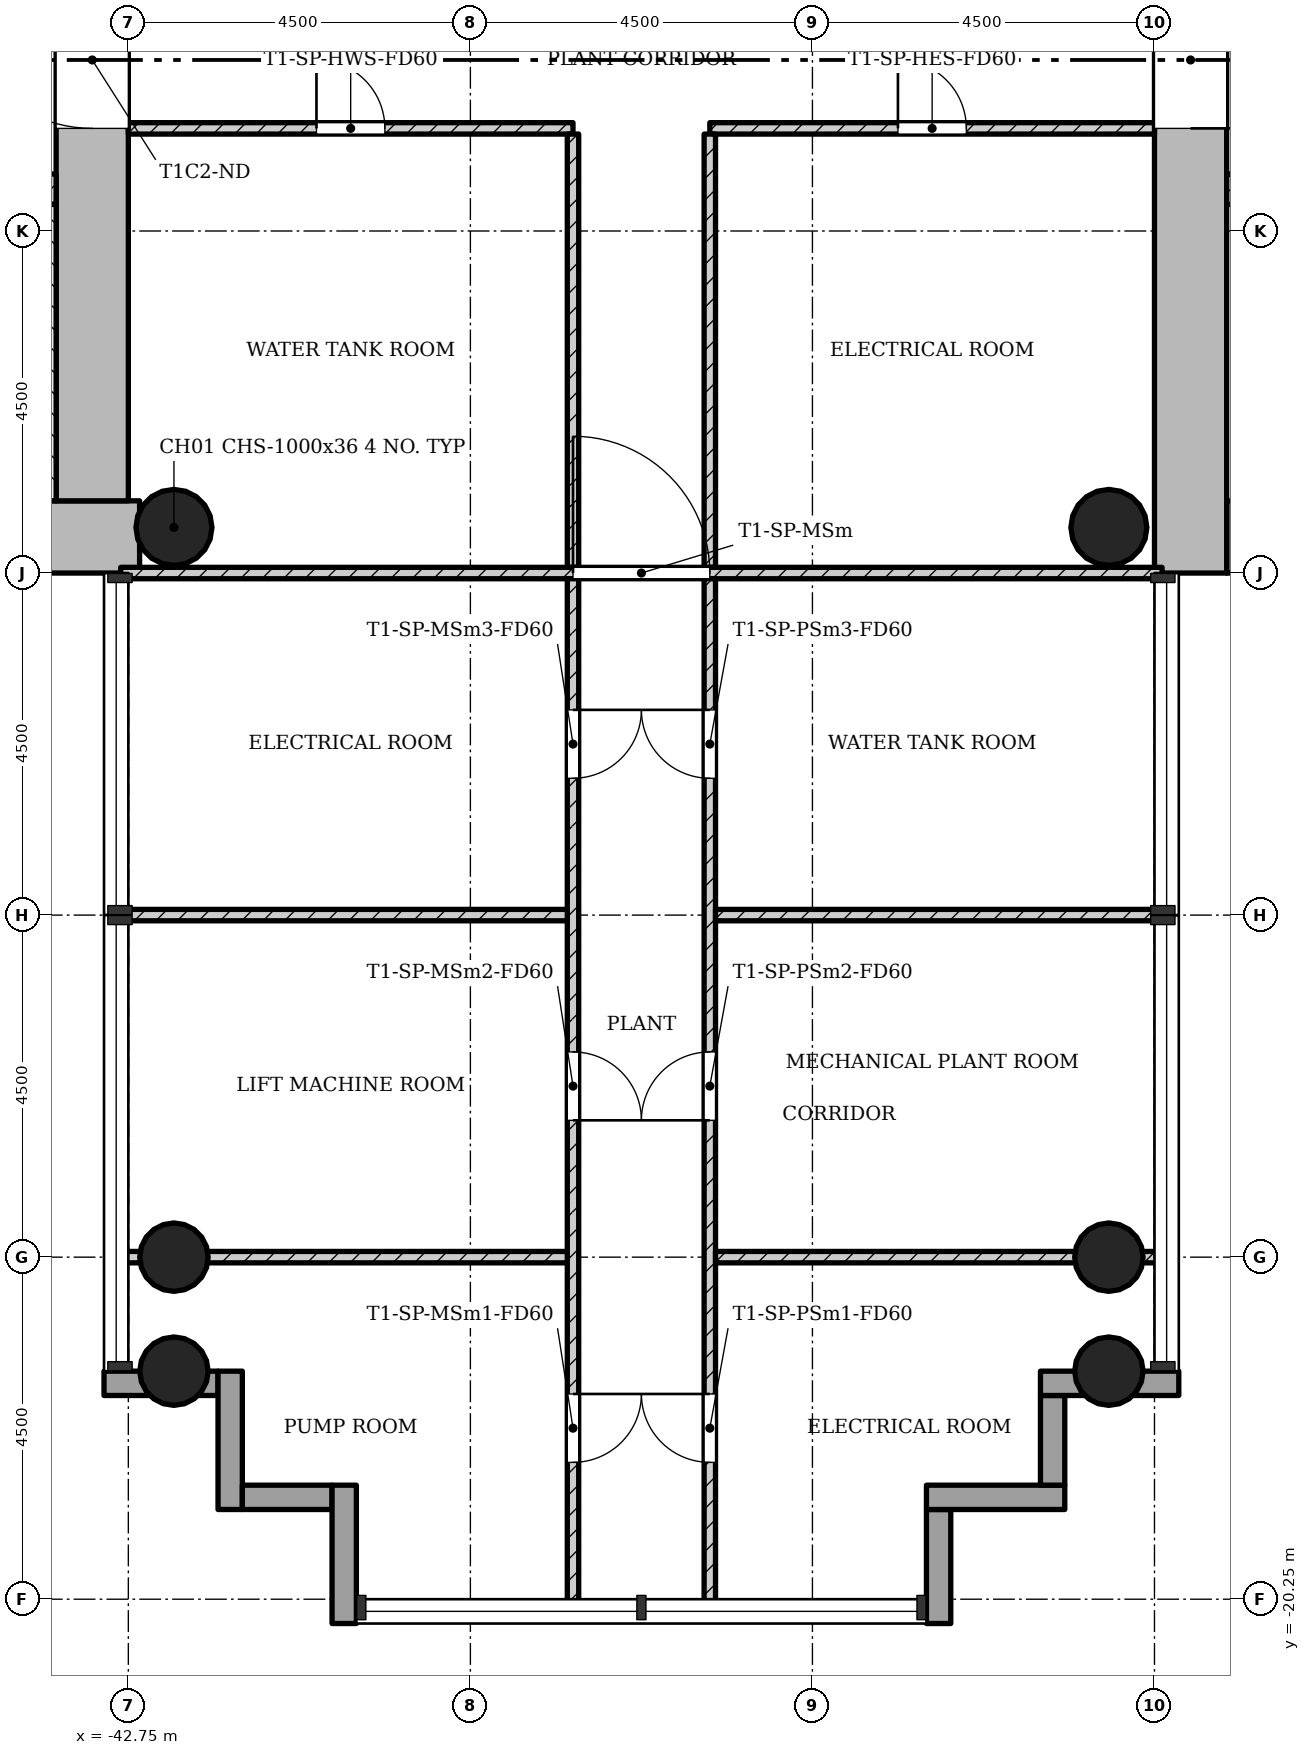
"""IFC4 building model, lengths in metres.
Left out: names, types, materials, properties, quantities, classifications, styles, units other than length and angle.
Written with IfcOpenShell. Run it as: python <this file> out.ifc"""

import sys

from ifc_helpers import new_model, si_unit, direction, frame, frame_2d, origin, origin_2d, place, context, subcontext, project, spatial, rectangle, hollow_circle, extrude, element, fill, save


model = new_model("IFC4")
c1 = context("Model", 3, precision=1e-05, world=origin(), true_north=direction((0.0, 1.0)))
c2 = subcontext(c1, "Body", "Model", "MODEL_VIEW")
j1 = project(units=[si_unit("LENGTHUNIT", "METRE"), si_unit("PLANEANGLEUNIT", "RADIAN")], contexts=[c1])
p1 = place(None, origin())
s1 = spatial("IfcSite", under=j1, at=p1, CompositionType="ELEMENT")
p2 = place(p1, origin())
s2 = spatial("IfcBuilding", under=s1, at=p2, CompositionType="ELEMENT")
p3 = place(p2, frame((0.0, 0.0, 124.2)))
s3 = spatial("IfcBuildingStorey", under=s2, at=p3, CompositionType="ELEMENT", Elevation=124.2)
p4 = place(p3, frame((-28.3, -6.275, 0.0), z_axis=(0.0, 0.0, 1.0), x_axis=(1.0, 0.0, 0.0)))
e1 = element("IfcWall", 1, at=p4, inside=s3, PredefinedType="SHEAR", context=c2, shape_type="SweptSolid", body=[
    extrude(rectangle(XDim=8.05, YDim=0.95, at=frame_2d((4.025, 0.0))), origin(), (0.0, 0.0, 1.0), 4.5),
])
p5 = place(p3, frame((-28.775, 5.8, 0.0), z_axis=(0.0, 0.0, 1.0), x_axis=(0.0, -1.0, 0.0)))
e2 = element("IfcWall", 2, at=p5, inside=s3, PredefinedType="SHEAR", context=c2, shape_type="SweptSolid", body=[
    extrude(rectangle(XDim=12.55, YDim=0.95, at=frame_2d((6.275, 0.0))), origin(), (0.0, 0.0, 1.0), 4.5),
])
p6 = place(p5, frame((4.9, 0.0, 0.0)))
e3 = element("IfcOpeningElement", 3, at=p6, cuts=e2, PredefinedType="OPENING", context=c2, shape_type="SweptSolid", body=[
    extrude(rectangle(XDim=1.8, YDim=2.1, at=frame_2d((0.9, 1.05))), frame((0.0, 0.485, 0.0), z_axis=(0.0, -1.0, 0.0), x_axis=(1.0, 0.0, 0.0)), (0.0, 0.0, 1.0), 0.97),
])
p7 = place(p3, frame((-28.3, -1.7, 0.0), z_axis=(0.0, 0.0, 1.0), x_axis=(1.0, 0.0, 0.0)))
e4 = element("IfcWall", 4, at=p7, inside=s3, PredefinedType="SHEAR", context=c2, shape_type="SweptSolid", body=[
    extrude(rectangle(XDim=7.1, YDim=0.4, at=frame_2d((3.55, 0.0))), origin(), (0.0, 0.0, 1.0), 4.5),
])
p8 = place(p3, frame((-51.298, -6.275, 0.0), z_axis=(0.0, 0.0, 1.0), x_axis=(1.0, 0.0, 0.0)))
e5 = element("IfcWall", 5, at=p8, inside=s3, PredefinedType="SHEAR", context=c2, shape_type="SweptSolid", body=[
    extrude(rectangle(XDim=8.696, YDim=0.95, at=frame_2d((4.348, 0.0))), origin(), (0.0, 0.0, 1.0), 4.5),
])
p9 = place(p3, frame((-43.225, -5.8, 0.0), z_axis=(0.0, 0.0, 1.0), x_axis=(0.0, 1.0, 0.0)))
e6 = element("IfcWall", 6, at=p9, inside=s3, PredefinedType="SHEAR", context=c2, shape_type="SweptSolid", body=[
    extrude(rectangle(XDim=12.55, YDim=0.95, at=frame_2d((6.275, 0.0))), origin(), (0.0, 0.0, 1.0), 4.5),
])
p10 = place(p9, frame((4.9, 0.0, 0.0)))
e7 = element("IfcOpeningElement", 7, at=p10, cuts=e6, PredefinedType="OPENING", context=c2, shape_type="SweptSolid", body=[
    extrude(rectangle(XDim=1.8, YDim=2.1, at=frame_2d((0.9, 1.05))), frame((0.0, 0.485, 0.0), z_axis=(0.0, -1.0, 0.0), x_axis=(1.0, 0.0, 0.0)), (0.0, 0.0, 1.0), 0.97),
])
p11 = place(p3, frame((-50.8, -1.7, 0.0), z_axis=(0.0, 0.0, 1.0), x_axis=(1.0, 0.0, 0.0)))
e8 = element("IfcWall", 8, at=p11, inside=s3, PredefinedType="SHEAR", context=c2, shape_type="SweptSolid", body=[
    extrude(rectangle(XDim=7.1, YDim=0.4, at=frame_2d((3.55, 0.0))), origin(), (0.0, 0.0, 1.0), 4.5),
])
p12 = place(p11, frame((5.5, 0.0, 0.0)))
e9 = element("IfcOpeningElement", 9, at=p12, cuts=e8, PredefinedType="OPENING", context=c2, shape_type="SweptSolid", body=[
    extrude(rectangle(XDim=0.9, YDim=2.1, at=frame_2d((0.45, 1.05))), frame((0.0, 0.21, 0.0), z_axis=(0.0, -1.0, 0.0), x_axis=(1.0, 0.0, 0.0)), (0.0, 0.0, 1.0), 0.42),
])
for number, where, z_axis, x_axis in (
    (10, (-42.15, -15.75, 0.0), (0.0, 0.0, 1.0), (1.0, 0.0, 0.0)),
    (11, (-29.85, -15.75, 0.0), (0.0, 0.0, 1.0), (1.0, 0.0, 0.0)),
    (12, (-42.15, -17.25, 0.0), (0.0, 0.0, 1.0), (1.0, 0.0, 0.0)),
    (13, (-29.85, -17.25, 0.0), (0.0, 0.0, 1.0), (1.0, 0.0, 0.0)),
):
    element("IfcColumn", number, at=place(p3, frame(where, z_axis=z_axis, x_axis=x_axis)), inside=s3, PredefinedType="COLUMN", context=c2, shape_type="SweptSolid", body=[
        extrude(hollow_circle(Radius=0.45, WallThickness=0.032, at=origin_2d()), origin(), (0.0, 0.0, 1.0), 4.5),
    ])
for number, where, z_axis, x_axis in (
    (14, (-42.15, -6.15, 0.0), (0.0, 0.0, 1.0), (1.0, 0.0, 0.0)),
    (15, (-29.85, -6.15, 0.0), (0.0, 0.0, 1.0), (1.0, 0.0, 0.0)),
):
    element("IfcColumn", number, at=place(p3, frame(where, z_axis=z_axis, x_axis=x_axis)), inside=s3, PredefinedType="COLUMN", context=c2, shape_type="SweptSolid", body=[
        extrude(hollow_circle(Radius=0.5, WallThickness=0.036, at=origin_2d()), origin(), (0.0, 0.0, 1.0), 4.5),
    ])
p13 = place(p3, frame((-43.07, -17.41, -0.3), z_axis=(0.0, 0.0, 1.0), x_axis=(1.0, 0.0, 0.0)))
e16 = element("IfcWall", 16, at=p13, inside=s3, PredefinedType="STANDARD", context=c2, shape_type="SweptSolid", body=[
    extrude(rectangle(XDim=1.5, YDim=0.32, at=frame_2d((0.75, 0.0))), origin(), (0.0, 0.0, 1.0), 4.5),
])
p14 = place(p3, frame((-41.41, -17.25, -0.3), z_axis=(0.0, 0.0, 1.0), x_axis=(0.0, -1.0, 0.0)))
e17 = element("IfcWall", 17, at=p14, inside=s3, PredefinedType="STANDARD", context=c2, shape_type="SweptSolid", body=[
    extrude(rectangle(XDim=1.82, YDim=0.32, at=frame_2d((0.91, 0.0))), origin(), (0.0, 0.0, 1.0), 4.5),
])
p15 = place(p3, frame((-41.25, -18.91, -0.3), z_axis=(0.0, 0.0, 1.0), x_axis=(1.0, 0.0, 0.0)))
e18 = element("IfcWall", 18, at=p15, inside=s3, PredefinedType="STANDARD", context=c2, shape_type="SweptSolid", body=[
    extrude(rectangle(XDim=1.18, YDim=0.32, at=frame_2d((0.59, 0.0))), origin(), (0.0, 0.0, 1.0), 4.5),
])
p16 = place(p3, frame((-39.91, -18.75, -0.3), z_axis=(0.0, 0.0, 1.0), x_axis=(0.0, -1.0, 0.0)))
e19 = element("IfcWall", 19, at=p16, inside=s3, PredefinedType="STANDARD", context=c2, shape_type="SweptSolid", body=[
    extrude(rectangle(XDim=1.82, YDim=0.32, at=frame_2d((0.91, 0.0))), origin(), (0.0, 0.0, 1.0), 4.5),
])
p17 = place(p3, frame((-32.09, -20.57, -0.3), z_axis=(0.0, 0.0, 1.0), x_axis=(0.0, 1.0, 0.0)))
e20 = element("IfcWall", 20, at=p17, inside=s3, PredefinedType="STANDARD", context=c2, shape_type="SweptSolid", body=[
    extrude(rectangle(XDim=1.5, YDim=0.32, at=frame_2d((0.75, 0.0))), origin(), (0.0, 0.0, 1.0), 4.5),
])
p18 = place(p3, frame((-32.25, -18.91, -0.3), z_axis=(0.0, 0.0, 1.0), x_axis=(1.0, 0.0, 0.0)))
e21 = element("IfcWall", 21, at=p18, inside=s3, PredefinedType="STANDARD", context=c2, shape_type="SweptSolid", body=[
    extrude(rectangle(XDim=1.82, YDim=0.32, at=frame_2d((0.91, 0.0))), origin(), (0.0, 0.0, 1.0), 4.5),
])
p19 = place(p3, frame((-30.59, -18.75, -0.3), z_axis=(0.0, 0.0, 1.0), x_axis=(0.0, 1.0, 0.0)))
e22 = element("IfcWall", 22, at=p19, inside=s3, PredefinedType="STANDARD", context=c2, shape_type="SweptSolid", body=[
    extrude(rectangle(XDim=1.18, YDim=0.32, at=frame_2d((0.59, 0.0))), origin(), (0.0, 0.0, 1.0), 4.5),
])
p20 = place(p3, frame((-30.75, -17.41, -0.3), z_axis=(0.0, 0.0, 1.0), x_axis=(1.0, 0.0, 0.0)))
e23 = element("IfcWall", 23, at=p20, inside=s3, PredefinedType="STANDARD", context=c2, shape_type="SweptSolid", body=[
    extrude(rectangle(XDim=1.82, YDim=0.32, at=frame_2d((0.91, 0.0))), origin(), (0.0, 0.0, 1.0), 4.5),
])
p21 = place(p3, frame((-35.1, -0.9, 0.0), z_axis=(0.0, 0.0, 1.0), x_axis=(1.0, 0.0, 0.0)))
e24 = element("IfcWall", 24, at=p21, inside=s3, PredefinedType="PARTITIONING", context=c2, shape_type="SweptSolid", body=[
    extrude(rectangle(XDim=5.85, YDim=0.15, at=frame_2d((2.925, 0.0))), origin(), (0.0, 0.0, 1.0), 4.1),
])
p22 = place(p21, frame((2.475, 0.0, 0.0)))
e25 = element("IfcOpeningElement", 25, at=p22, cuts=e24, PredefinedType="OPENING", context=c2, shape_type="SweptSolid", body=[
    extrude(rectangle(XDim=0.9, YDim=2.1, at=frame_2d((0.45, 1.05))), frame((0.0, 0.085, 0.0), z_axis=(0.0, -1.0, 0.0), x_axis=(1.0, 0.0, 0.0)), (0.0, 0.0, 1.0), 0.17),
])
p23 = place(p3, frame((-35.1, -6.675, 0.0), z_axis=(0.0, 0.0, 1.0), x_axis=(0.0, 1.0, 0.0)))
e26 = element("IfcWall", 26, at=p23, inside=s3, PredefinedType="PARTITIONING", context=c2, shape_type="SweptSolid", body=[
    extrude(rectangle(XDim=5.7, YDim=0.15, at=frame_2d((2.85, 0.0))), origin(), (0.0, 0.0, 1.0), 4.1),
])
p24 = place(p3, frame((-42.75, -0.9, 0.0), z_axis=(0.0, 0.0, 1.0), x_axis=(1.0, 0.0, 0.0)))
e27 = element("IfcWall", 27, at=p24, inside=s3, PredefinedType="PARTITIONING", context=c2, shape_type="SweptSolid", body=[
    extrude(rectangle(XDim=5.85, YDim=0.15, at=frame_2d((2.925, 0.0))), origin(), (0.0, 0.0, 1.0), 4.1),
])
p25 = place(p24, frame((2.475, 0.0, 0.0)))
e28 = element("IfcOpeningElement", 28, at=p25, cuts=e27, PredefinedType="OPENING", context=c2, shape_type="SweptSolid", body=[
    extrude(rectangle(XDim=0.9, YDim=2.1, at=frame_2d((0.45, 1.05))), frame((0.0, 0.085, 0.0), z_axis=(0.0, -1.0, 0.0), x_axis=(1.0, 0.0, 0.0)), (0.0, 0.0, 1.0), 0.17),
])
p26 = place(p3, frame((-36.9, -6.675, 0.0), z_axis=(0.0, 0.0, 1.0), x_axis=(0.0, 1.0, 0.0)))
e29 = element("IfcWall", 29, at=p26, inside=s3, PredefinedType="PARTITIONING", context=c2, shape_type="SweptSolid", body=[
    extrude(rectangle(XDim=5.7, YDim=0.15, at=frame_2d((2.85, 0.0))), origin(), (0.0, 0.0, 1.0), 4.1),
])
p27 = place(p3, frame((-42.85, -6.75, 0.0), z_axis=(0.0, 0.0, 1.0), x_axis=(1.0, 0.0, 0.0)))
e30 = element("IfcWall", 30, at=p27, inside=s3, PredefinedType="PARTITIONING", context=c2, shape_type="SweptSolid", body=[
    extrude(rectangle(XDim=13.7, YDim=0.15, at=frame_2d((6.85, 0.0))), origin(), (0.0, 0.0, 1.0), 4.1),
])
p28 = place(p27, frame((5.95, 0.0, 0.0)))
e31 = element("IfcOpeningElement", 31, at=p28, cuts=e30, PredefinedType="OPENING", context=c2, shape_type="SweptSolid", body=[
    extrude(rectangle(XDim=1.8, YDim=2.1, at=frame_2d((0.9, 1.05))), frame((0.0, 0.085, 0.0), z_axis=(0.0, -1.0, 0.0), x_axis=(1.0, 0.0, 0.0)), (0.0, 0.0, 1.0), 0.17),
])
p29 = place(p3, frame((-35.1, -20.35, 0.0), z_axis=(0.0, 0.0, 1.0), x_axis=(0.0, 1.0, 0.0)))
e32 = element("IfcWall", 32, at=p29, inside=s3, PredefinedType="PARTITIONING", context=c2, shape_type="SweptSolid", body=[
    extrude(rectangle(XDim=13.525, YDim=0.15, at=frame_2d((6.763, 0.0))), origin(), (0.0, 0.0, 1.0), 4.1),
])
p30 = place(p29, frame((1.9, 0.0, 0.0)))
e33 = element("IfcOpeningElement", 33, at=p30, cuts=e32, PredefinedType="OPENING", context=c2, shape_type="SweptSolid", body=[
    extrude(rectangle(XDim=0.9, YDim=2.1, at=frame_2d((0.45, 1.05))), frame((0.0, 0.085, 0.0), z_axis=(0.0, -1.0, 0.0), x_axis=(1.0, 0.0, 0.0)), (0.0, 0.0, 1.0), 0.17),
])
p31 = place(p29, frame((6.4, 0.0, 0.0)))
e34 = element("IfcOpeningElement", 34, at=p31, cuts=e32, PredefinedType="OPENING", context=c2, shape_type="SweptSolid", body=[
    extrude(rectangle(XDim=0.9, YDim=2.1, at=frame_2d((0.45, 1.05))), frame((0.0, 0.085, 0.0), z_axis=(0.0, -1.0, 0.0), x_axis=(1.0, 0.0, 0.0)), (0.0, 0.0, 1.0), 0.17),
])
p32 = place(p29, frame((10.9, 0.0, 0.0)))
e35 = element("IfcOpeningElement", 35, at=p32, cuts=e32, PredefinedType="OPENING", context=c2, shape_type="SweptSolid", body=[
    extrude(rectangle(XDim=0.9, YDim=2.1, at=frame_2d((0.45, 1.05))), frame((0.0, 0.085, 0.0), z_axis=(0.0, -1.0, 0.0), x_axis=(1.0, 0.0, 0.0)), (0.0, 0.0, 1.0), 0.17),
])
for number, where, z_axis, x_axis in (
    (36, (-35.025, -15.75, 0.0), (0.0, 0.0, 1.0), (1.0, 0.0, 0.0)),
    (37, (-35.025, -11.25, 0.0), (0.0, 0.0, 1.0), (1.0, 0.0, 0.0)),
):
    element("IfcWall", number, at=place(p3, frame(where, z_axis=z_axis, x_axis=x_axis)), inside=s3, PredefinedType="PARTITIONING", context=c2, shape_type="SweptSolid", body=[
        extrude(rectangle(XDim=5.875, YDim=0.15, at=frame_2d((2.938, 0.0))), origin(), (0.0, 0.0, 1.0), 4.1),
    ])
p33 = place(p3, frame((-36.9, -20.35, 0.0), z_axis=(0.0, 0.0, 1.0), x_axis=(0.0, 1.0, 0.0)))
e38 = element("IfcWall", 38, at=p33, inside=s3, PredefinedType="PARTITIONING", context=c2, shape_type="SweptSolid", body=[
    extrude(rectangle(XDim=13.525, YDim=0.15, at=frame_2d((6.763, 0.0))), origin(), (0.0, 0.0, 1.0), 4.1),
])
p34 = place(p33, frame((1.9, 0.0, 0.0)))
e39 = element("IfcOpeningElement", 39, at=p34, cuts=e38, PredefinedType="OPENING", context=c2, shape_type="SweptSolid", body=[
    extrude(rectangle(XDim=0.9, YDim=2.1, at=frame_2d((0.45, 1.05))), frame((0.0, 0.085, 0.0), z_axis=(0.0, -1.0, 0.0), x_axis=(1.0, 0.0, 0.0)), (0.0, 0.0, 1.0), 0.17),
])
p35 = place(p33, frame((6.4, 0.0, 0.0)))
e40 = element("IfcOpeningElement", 40, at=p35, cuts=e38, PredefinedType="OPENING", context=c2, shape_type="SweptSolid", body=[
    extrude(rectangle(XDim=0.9, YDim=2.1, at=frame_2d((0.45, 1.05))), frame((0.0, 0.085, 0.0), z_axis=(0.0, -1.0, 0.0), x_axis=(1.0, 0.0, 0.0)), (0.0, 0.0, 1.0), 0.17),
])
p36 = place(p33, frame((10.9, 0.0, 0.0)))
e41 = element("IfcOpeningElement", 41, at=p36, cuts=e38, PredefinedType="OPENING", context=c2, shape_type="SweptSolid", body=[
    extrude(rectangle(XDim=0.9, YDim=2.1, at=frame_2d((0.45, 1.05))), frame((0.0, 0.085, 0.0), z_axis=(0.0, -1.0, 0.0), x_axis=(1.0, 0.0, 0.0)), (0.0, 0.0, 1.0), 0.17),
])
for number, where, z_axis, x_axis in (
    (42, (-36.975, -15.75, 0.0), (0.0, 0.0, 1.0), (-1.0, 0.0, 0.0)),
    (43, (-36.975, -11.25, 0.0), (0.0, 0.0, 1.0), (-1.0, 0.0, 0.0)),
):
    element("IfcWall", number, at=place(p3, frame(where, z_axis=z_axis, x_axis=x_axis)), inside=s3, PredefinedType="PARTITIONING", context=c2, shape_type="SweptSolid", body=[
        extrude(rectangle(XDim=5.875, YDim=0.15, at=frame_2d((2.938, 0.0))), origin(), (0.0, 0.0, 1.0), 4.1),
    ])
p37 = place(p3, frame((-43.825, -1.9, 0.0), z_axis=(0.0, 0.0, 1.0), x_axis=(0.0, -1.0, 0.0)))
e44 = element("IfcWall", 44, at=p37, inside=s3, PredefinedType="SHEAR", context=c2, shape_type="SweptSolid", body=[
    extrude(rectangle(XDim=3.9, YDim=0.25, at=frame_2d((1.95, 0.0))), origin(), (0.0, 0.0, 1.0), 4.5),
])
p38 = place(p22, origin())
e45 = element("IfcDoor", 45, at=p38, inside=s3, OperationType="SINGLE_SWING_RIGHT", PredefinedType="DOOR", context=c2, shape_type="SweptSolid", body=[
    extrude(rectangle(XDim=0.9, YDim=2.1, at=frame_2d((0.45, 1.05))), frame((0.0, 0.025, 0.0), z_axis=(0.0, -1.0, 0.0), x_axis=(1.0, 0.0, 0.0)), (0.0, 0.0, 1.0), 0.05),
])
fill(e25, e45)
p39 = place(p25, origin())
e46 = element("IfcDoor", 46, at=p39, inside=s3, OperationType="SINGLE_SWING_RIGHT", PredefinedType="DOOR", context=c2, shape_type="SweptSolid", body=[
    extrude(rectangle(XDim=0.9, YDim=2.1, at=frame_2d((0.45, 1.05))), frame((0.0, 0.025, 0.0), z_axis=(0.0, -1.0, 0.0), x_axis=(1.0, 0.0, 0.0)), (0.0, 0.0, 1.0), 0.05),
])
fill(e28, e46)
p40 = place(p28, origin())
e47 = element("IfcDoor", 47, at=p40, inside=s3, OperationType="SINGLE_SWING_RIGHT", PredefinedType="DOOR", context=c2, shape_type="SweptSolid", body=[
    extrude(rectangle(XDim=1.8, YDim=2.1, at=frame_2d((0.9, 1.05))), frame((0.0, 0.025, 0.0), z_axis=(0.0, -1.0, 0.0), x_axis=(1.0, 0.0, 0.0)), (0.0, 0.0, 1.0), 0.05),
])
fill(e31, e47)
p41 = place(p30, origin())
e48 = element("IfcDoor", 48, at=p41, inside=s3, OperationType="SINGLE_SWING_LEFT", PredefinedType="DOOR", context=c2, shape_type="SweptSolid", body=[
    extrude(rectangle(XDim=0.9, YDim=2.1, at=frame_2d((0.45, 1.05))), frame((0.0, 0.025, 0.0), z_axis=(0.0, -1.0, 0.0), x_axis=(1.0, 0.0, 0.0)), (0.0, 0.0, 1.0), 0.05),
])
fill(e33, e48)
p42 = place(p31, origin())
e49 = element("IfcDoor", 49, at=p42, inside=s3, OperationType="SINGLE_SWING_RIGHT", PredefinedType="DOOR", context=c2, shape_type="SweptSolid", body=[
    extrude(rectangle(XDim=0.9, YDim=2.1, at=frame_2d((0.45, 1.05))), frame((0.0, 0.025, 0.0), z_axis=(0.0, -1.0, 0.0), x_axis=(1.0, 0.0, 0.0)), (0.0, 0.0, 1.0), 0.05),
])
fill(e34, e49)
p43 = place(p32, origin())
e50 = element("IfcDoor", 50, at=p43, inside=s3, OperationType="SINGLE_SWING_LEFT", PredefinedType="DOOR", context=c2, shape_type="SweptSolid", body=[
    extrude(rectangle(XDim=0.9, YDim=2.1, at=frame_2d((0.45, 1.05))), frame((0.0, 0.025, 0.0), z_axis=(0.0, -1.0, 0.0), x_axis=(1.0, 0.0, 0.0)), (0.0, 0.0, 1.0), 0.05),
])
fill(e35, e50)
p44 = place(p34, origin())
e51 = element("IfcDoor", 51, at=p44, inside=s3, OperationType="SINGLE_SWING_RIGHT", PredefinedType="DOOR", context=c2, shape_type="SweptSolid", body=[
    extrude(rectangle(XDim=0.9, YDim=2.1, at=frame_2d((0.45, 1.05))), frame((0.0, 0.025, 0.0), z_axis=(0.0, -1.0, 0.0), x_axis=(1.0, 0.0, 0.0)), (0.0, 0.0, 1.0), 0.05),
])
fill(e39, e51)
p45 = place(p35, origin())
e52 = element("IfcDoor", 52, at=p45, inside=s3, OperationType="SINGLE_SWING_LEFT", PredefinedType="DOOR", context=c2, shape_type="SweptSolid", body=[
    extrude(rectangle(XDim=0.9, YDim=2.1, at=frame_2d((0.45, 1.05))), frame((0.0, 0.025, 0.0), z_axis=(0.0, -1.0, 0.0), x_axis=(1.0, 0.0, 0.0)), (0.0, 0.0, 1.0), 0.05),
])
fill(e40, e52)
p46 = place(p36, origin())
e53 = element("IfcDoor", 53, at=p46, inside=s3, OperationType="SINGLE_SWING_RIGHT", PredefinedType="DOOR", context=c2, shape_type="SweptSolid", body=[
    extrude(rectangle(XDim=0.9, YDim=2.1, at=frame_2d((0.45, 1.05))), frame((0.0, 0.025, 0.0), z_axis=(0.0, -1.0, 0.0), x_axis=(1.0, 0.0, 0.0)), (0.0, 0.0, 1.0), 0.05),
])
fill(e41, e53)
p47 = place(p6, origin())
e54 = element("IfcDoor", 54, at=p47, inside=s3, OperationType="SINGLE_SWING_LEFT", PredefinedType="DOOR", context=c2, shape_type="SweptSolid", body=[
    extrude(rectangle(XDim=1.8, YDim=2.1, at=frame_2d((0.9, 1.05))), frame((0.0, 0.025, 0.0), z_axis=(0.0, -1.0, 0.0), x_axis=(1.0, 0.0, 0.0)), (0.0, 0.0, 1.0), 0.05),
])
fill(e3, e54)
p48 = place(p10, origin())
e55 = element("IfcDoor", 55, at=p48, inside=s3, OperationType="SINGLE_SWING_LEFT", PredefinedType="DOOR", context=c2, shape_type="SweptSolid", body=[
    extrude(rectangle(XDim=1.8, YDim=2.1, at=frame_2d((0.9, 1.05))), frame((0.0, 0.025, 0.0), z_axis=(0.0, -1.0, 0.0), x_axis=(1.0, 0.0, 0.0)), (0.0, 0.0, 1.0), 0.05),
])
fill(e7, e55)
save(model, sys.argv[1])
